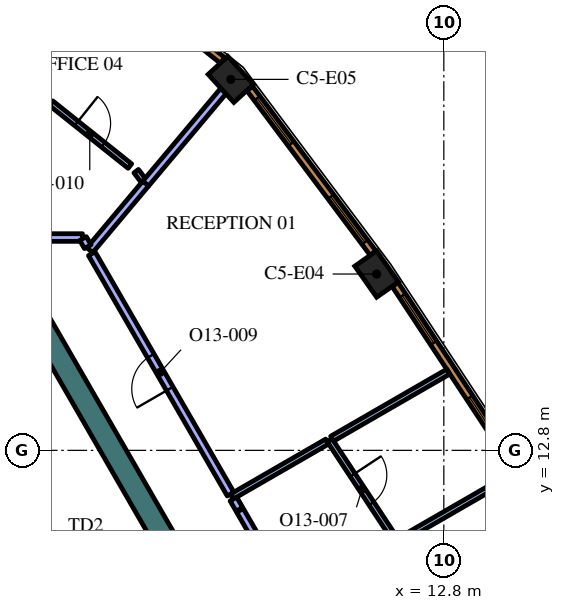
"""IFC4 building model, lengths in metres.
Left out: names, types, materials, properties, quantities, classifications, styles, units other than length and angle.
Written with IfcOpenShell. Run it as: python <this file> out.ifc"""

import sys

from ifc_helpers import new_model, si_unit, direction, frame, frame_2d, origin, origin_2d, place, context, subcontext, project, spatial, rectangle, extrude, element, fill, save


model = new_model("IFC4")
c1 = context("Model", 3, precision=1e-05, world=origin(), true_north=direction((0.0, 1.0)))
c2 = subcontext(c1, "Body", "Model", "MODEL_VIEW")
j1 = project(units=[si_unit("LENGTHUNIT", "METRE"), si_unit("PLANEANGLEUNIT", "RADIAN")], contexts=[c1])
p1 = place(None, origin())
s1 = spatial("IfcSite", under=j1, at=p1, CompositionType="ELEMENT")
p2 = place(p1, origin())
s2 = spatial("IfcBuilding", under=s1, at=p2, CompositionType="ELEMENT")
p3 = place(p2, frame((0.0, 0.0, 292.2)))
s3 = spatial("IfcBuildingStorey", under=s2, at=p3, CompositionType="ELEMENT", Elevation=292.2)
for number, where, z_axis, x_axis in (
    (1, (11.032, 17.44, 0.0), (0.0, 0.0, 1.0), (-0.575, 0.818, 0.0)),
    (2, (7.195, 22.561, 0.0), (0.0, 0.0, 1.0), (-0.676, 0.737, 0.0)),
):
    element("IfcColumn", number, at=place(p3, frame(where, z_axis=z_axis, x_axis=x_axis)), inside=s3, PredefinedType="COLUMN", context=c2, shape_type="SweptSolid", body=[
        extrude(rectangle(XDim=1.0, YDim=0.7, at=origin_2d()), origin(), (0.0, 0.0, 1.0), 4.2),
    ])
p4 = place(p3, frame((1.989, 16.456, 0.0), z_axis=(0.0, 0.0, 1.0), x_axis=(0.49999102663, -0.8660305845, 0.0)))
e3 = element("IfcWall", 3, at=p4, inside=s3, PredefinedType="SOLIDWALL", context=c2, shape_type="SweptSolid", body=[
    extrude(rectangle(XDim=12.406, YDim=0.6, at=frame_2d((6.203, 0.0))), origin(), (0.0, 0.0, 1.0), 4.2),
])
p5 = place(p3, frame((11.564, 10.387, 0.0), z_axis=(0.0, 0.0, 1.0), x_axis=(0.86604641216, 0.499963610661, 0.0)))
e4 = element("IfcWall", 4, at=p5, inside=s3, PredefinedType="PARTITIONING", context=c2, shape_type="SweptSolid", body=[
    extrude(rectangle(XDim=3.096, YDim=0.15, at=frame_2d((1.548, 0.0))), origin(), (0.0, 0.0, 1.0), 3.55),
])
p6 = place(p3, frame((9.795, 13.068, 0.0), z_axis=(0.0, 0.0, 1.0), x_axis=(0.550767347659, -0.834658809786, 0.0)))
e5 = element("IfcWall", 5, at=p6, inside=s3, PredefinedType="PARTITIONING", context=c2, shape_type="SweptSolid", body=[
    extrude(rectangle(XDim=2.999, YDim=0.15, at=frame_2d((1.5, 0.0))), origin(), (0.0, 0.0, 1.0), 3.55),
])
p7 = place(p6, frame((1.099, 0.0, 0.0)))
e6 = element("IfcOpeningElement", 6, at=p7, cuts=e5, PredefinedType="OPENING", context=c2, shape_type="SweptSolid", body=[
    extrude(rectangle(XDim=0.9, YDim=2.1, at=frame_2d((0.45, 1.05))), frame((0.0, 0.085, 0.0), z_axis=(0.0, -1.0, 0.0), x_axis=(1.0, 0.0, 0.0)), (0.0, 0.0, 1.0), 0.17),
])
p8 = place(p3, frame((9.86, 13.106, 0.0), z_axis=(0.0, 0.0, 1.0), x_axis=(0.866022094817, 0.500005731256, 0.0)))
e7 = element("IfcWall", 7, at=p8, inside=s3, PredefinedType="PARTITIONING", context=c2, shape_type="SweptSolid", body=[
    extrude(rectangle(XDim=3.531, YDim=0.15, at=frame_2d((1.766, 0.0))), origin(), (0.0, 0.0, 1.0), 3.55),
])
p9 = place(p3, frame((7.226, 11.585, 0.0), z_axis=(0.0, 0.0, 1.0), x_axis=(0.866021079084, 0.500007490527, 0.0)))
e8 = element("IfcWall", 8, at=p9, inside=s3, PredefinedType="PARTITIONING", context=c2, shape_type="SweptSolid", body=[
    extrude(rectangle(XDim=2.892, YDim=0.15, at=frame_2d((1.446, 0.0))), origin(), (0.0, 0.0, 1.0), 3.55),
])
p10 = place(p3, frame((13.436, 0.829, 0.0), z_axis=(0.0, 0.0, 1.0), x_axis=(-0.49999894854, 0.866026010844, 0.0)))
e9 = element("IfcWall", 9, at=p10, inside=s3, PredefinedType="PARTITIONING", context=c2, shape_type="SweptSolid", body=[
    extrude(rectangle(XDim=12.0, YDim=0.2, at=frame_2d((6.0, 0.0))), origin(), (0.0, 0.0, 1.0), 3.55),
])
p11 = place(p10, frame((5.5, 0.0, 0.0)))
e10 = element("IfcOpeningElement", 10, at=p11, cuts=e9, PredefinedType="OPENING", context=c2, shape_type="SweptSolid", body=[
    extrude(rectangle(XDim=1.0, YDim=2.1, at=frame_2d((0.5, 1.05))), frame((0.0, 0.11, 0.0), z_axis=(0.0, -1.0, 0.0), x_axis=(1.0, 0.0, 0.0)), (0.0, 0.0, 1.0), 0.22),
])
p12 = place(p3, frame((7.421, 11.247, 0.0), z_axis=(0.0, 0.0, 1.0), x_axis=(-0.500303403544, 0.865850162789, 0.0)))
e11 = element("IfcWall", 11, at=p12, inside=s3, PredefinedType="PARTITIONING", context=c2, shape_type="SweptSolid", body=[
    extrude(rectangle(XDim=0.315, YDim=0.2, at=frame_2d((0.158, 0.0))), origin(), (0.0, 0.0, 1.0), 3.55),
])
p13 = place(p3, frame((4.95, 19.814, 0.0), z_axis=(0.0, 0.0, 1.0), x_axis=(0.642981953866, 0.765881326971, 0.0)))
e12 = element("IfcWall", 12, at=p13, inside=s3, PredefinedType="PARTITIONING", context=c2, shape_type="SweptSolid", body=[
    extrude(rectangle(XDim=3.188, YDim=0.2, at=frame_2d((1.594, 0.0))), origin(), (0.0, 0.0, 1.0), 3.55),
])
p14 = place(p3, frame((3.483, 18.067, 0.0), z_axis=(0.0, 0.0, 1.0), x_axis=(0.642896944312, 0.765952687177, 0.0)))
e13 = element("IfcWall", 13, at=p14, inside=s3, PredefinedType="PARTITIONING", context=c2, shape_type="SweptSolid", body=[
    extrude(rectangle(XDim=2.29, YDim=0.2, at=frame_2d((1.145, 0.0))), origin(), (0.0, 0.0, 1.0), 3.55),
])
p15 = place(p3, frame((7.188, 11.65, 0.0), z_axis=(0.0, 0.0, 1.0), x_axis=(-0.499989634868, 0.866031388014, 0.0)))
e14 = element("IfcWall", 14, at=p15, inside=s3, PredefinedType="PARTITIONING", context=c2, shape_type="SweptSolid", body=[
    extrude(rectangle(XDim=7.303, YDim=0.2, at=frame_2d((3.652, 0.0))), origin(), (0.0, 0.0, 1.0), 3.55),
])
p16 = place(p15, frame((3.2, 0.0, 0.0)))
e15 = element("IfcOpeningElement", 15, at=p16, cuts=e14, PredefinedType="OPENING", context=c2, shape_type="SweptSolid", body=[
    extrude(rectangle(XDim=1.0, YDim=2.1, at=frame_2d((0.5, 1.05))), frame((0.0, 0.11, 0.0), z_axis=(0.0, -1.0, 0.0), x_axis=(1.0, 0.0, 0.0)), (0.0, 0.0, 1.0), 0.22),
])
p17 = place(p3, frame((4.891, 19.899, 0.0), z_axis=(0.0, 0.0, 1.0), x_axis=(-0.6, 0.8, 0.0)))
e16 = element("IfcWall", 16, at=p17, inside=s3, PredefinedType="PARTITIONING", context=c2, shape_type="SweptSolid", body=[
    extrude(rectangle(XDim=0.309, YDim=0.15, at=frame_2d((0.154, 0.0))), origin(), (0.0, 0.0, 1.0), 3.55),
])
p18 = place(p3, frame((2.462, 21.937, 0.0), z_axis=(0.0, 0.0, 1.0), x_axis=(0.781630346222, -0.62374193531, 0.0)))
e17 = element("IfcWall", 17, at=p18, inside=s3, PredefinedType="PARTITIONING", context=c2, shape_type="SweptSolid", body=[
    extrude(rectangle(XDim=2.656, YDim=0.15, at=frame_2d((1.328, 0.0))), origin(), (0.0, 0.0, 1.0), 3.55),
])
p19 = place(p18, frame((0.857, 0.0, 0.0)))
e18 = element("IfcOpeningElement", 18, at=p19, cuts=e17, PredefinedType="OPENING", context=c2, shape_type="SweptSolid", body=[
    extrude(rectangle(XDim=0.9, YDim=2.1, at=frame_2d((0.45, 1.05))), frame((0.0, 0.085, 0.0), z_axis=(0.0, -1.0, 0.0), x_axis=(1.0, 0.0, 0.0)), (0.0, 0.0, 1.0), 0.17),
])
p20 = place(p3, frame((3.291, 18.4, 0.0), z_axis=(0.0, 0.0, 1.0), x_axis=(-1.0, 0.0, 0.0)))
e19 = element("IfcWall", 19, at=p20, inside=s3, PredefinedType="PARTITIONING", context=c2, shape_type="SweptSolid", body=[
    extrude(rectangle(XDim=6.582, YDim=0.2, at=frame_2d((3.291, 0.0))), origin(), (0.0, 0.0, 1.0), 3.55),
])
p21 = place(p3, frame((3.43, 18.159, 0.0), z_axis=(0.0, 0.0, 1.0), x_axis=(-0.499949632511, 0.866054481515, 0.0)))
e20 = element("IfcWall", 20, at=p21, inside=s3, PredefinedType="PARTITIONING", context=c2, shape_type="SweptSolid", body=[
    extrude(rectangle(XDim=0.248, YDim=0.2, at=frame_2d((0.124, 0.0))), origin(), (0.0, 0.0, 1.0), 3.55),
])
p22 = place(p3, frame((14.496, 12.653, 0.0), z_axis=(0.0, 0.0, 1.0), x_axis=(-0.550744054781, 0.83467417962, 0.0)))
e21 = element("IfcWall", 21, at=p22, inside=s3, PredefinedType="SOLIDWALL", context=c2, shape_type="SweptSolid", body=[
    extrude(rectangle(XDim=5.406, YDim=0.19, at=frame_2d((2.703, 0.0))), origin(), (0.0, 0.0, 1.0), 3.95),
])
p23 = place(p22, frame((0.346, 0.0, 0.6)))
e22 = element("IfcOpeningElement", 22, at=p23, cuts=e21, PredefinedType="OPENING", context=c2, shape_type="SweptSolid", body=[
    extrude(rectangle(XDim=1.5, YDim=2.85, at=frame_2d((0.75, 1.425))), frame((0.0, 0.105, 0.0), z_axis=(0.0, -1.0, 0.0), x_axis=(1.0, 0.0, 0.0)), (0.0, 0.0, 1.0), 0.21),
])
p24 = place(p22, frame((3.559, 0.0, 0.6)))
e23 = element("IfcOpeningElement", 23, at=p24, cuts=e21, PredefinedType="OPENING", context=c2, shape_type="SweptSolid", body=[
    extrude(rectangle(XDim=1.5, YDim=2.85, at=frame_2d((0.75, 1.425))), frame((0.0, 0.105, 0.0), z_axis=(0.0, -1.0, 0.0), x_axis=(1.0, 0.0, 0.0)), (0.0, 0.0, 1.0), 0.21),
])
p25 = place(p3, frame((10.938, 17.99, 0.0), z_axis=(0.0, 0.0, 1.0), x_axis=(-0.599559865294, 0.800329911929, 0.0)))
e24 = element("IfcWall", 24, at=p25, inside=s3, PredefinedType="SOLIDWALL", context=c2, shape_type="SweptSolid", body=[
    extrude(rectangle(XDim=5.415, YDim=0.19, at=frame_2d((2.708, 0.0))), origin(), (0.0, 0.0, 1.0), 3.95),
])
p26 = place(p25, frame((0.358, 0.0, 0.6)))
e25 = element("IfcOpeningElement", 25, at=p26, cuts=e24, PredefinedType="OPENING", context=c2, shape_type="SweptSolid", body=[
    extrude(rectangle(XDim=1.5, YDim=2.85, at=frame_2d((0.75, 1.425))), frame((0.0, 0.105, 0.0), z_axis=(0.0, -1.0, 0.0), x_axis=(1.0, 0.0, 0.0)), (0.0, 0.0, 1.0), 0.21),
])
p27 = place(p25, frame((3.593, 0.0, 0.6)))
e26 = element("IfcOpeningElement", 26, at=p27, cuts=e24, PredefinedType="OPENING", context=c2, shape_type="SweptSolid", body=[
    extrude(rectangle(XDim=1.5, YDim=2.85, at=frame_2d((0.75, 1.425))), frame((0.0, 0.105, 0.0), z_axis=(0.0, -1.0, 0.0), x_axis=(1.0, 0.0, 0.0)), (0.0, 0.0, 1.0), 0.21),
])
p28 = place(p3, frame((6.977, 23.061, 0.0), z_axis=(0.0, 0.0, 1.0), x_axis=(-0.781626234064, 0.623747088349, 0.0)))
e27 = element("IfcWall", 27, at=p28, inside=s3, PredefinedType="SOLIDWALL", context=c2, shape_type="SweptSolid", body=[
    extrude(rectangle(XDim=3.237, YDim=0.19, at=frame_2d((1.618, 0.0))), origin(), (0.0, 0.0, 1.0), 3.95),
])
p29 = place(p28, frame((1.068, 0.0, 0.6)))
e28 = element("IfcOpeningElement", 28, at=p29, cuts=e27, PredefinedType="OPENING", context=c2, shape_type="SweptSolid", body=[
    extrude(rectangle(XDim=1.1, YDim=2.85, at=frame_2d((0.55, 1.425))), frame((0.0, 0.105, 0.0), z_axis=(0.0, -1.0, 0.0), x_axis=(1.0, 0.0, 0.0)), (0.0, 0.0, 1.0), 0.21),
])
p30 = place(p7, origin())
e29 = element("IfcDoor", 29, at=p30, inside=s3, OperationType="SINGLE_SWING_RIGHT", PredefinedType="DOOR", context=c2, shape_type="SweptSolid", body=[
    extrude(rectangle(XDim=0.9, YDim=2.1, at=frame_2d((0.45, 1.05))), frame((0.0, 0.025, 0.0), z_axis=(0.0, -1.0, 0.0), x_axis=(1.0, 0.0, 0.0)), (0.0, 0.0, 1.0), 0.05),
])
fill(e6, e29)
p31 = place(p16, origin())
e30 = element("IfcDoor", 30, at=p31, inside=s3, OperationType="SINGLE_SWING_RIGHT", PredefinedType="DOOR", context=c2, shape_type="SweptSolid", body=[
    extrude(rectangle(XDim=1.0, YDim=2.1, at=frame_2d((0.5, 1.05))), frame((0.0, 0.025, 0.0), z_axis=(0.0, -1.0, 0.0), x_axis=(1.0, 0.0, 0.0)), (0.0, 0.0, 1.0), 0.05),
])
fill(e15, e30)
p32 = place(p19, origin())
e31 = element("IfcDoor", 31, at=p32, inside=s3, OperationType="SINGLE_SWING_LEFT", PredefinedType="DOOR", context=c2, shape_type="SweptSolid", body=[
    extrude(rectangle(XDim=0.9, YDim=2.1, at=frame_2d((0.45, 1.05))), frame((0.0, 0.025, 0.0), z_axis=(0.0, -1.0, 0.0), x_axis=(1.0, 0.0, 0.0)), (0.0, 0.0, 1.0), 0.05),
])
fill(e18, e31)
p33 = place(p23, origin())
e32 = element("IfcWindow", 32, at=p33, inside=s3, PartitioningType="SINGLE_PANEL", PredefinedType="WINDOW", context=c2, shape_type="SweptSolid", body=[
    extrude(rectangle(XDim=1.5, YDim=2.85, at=frame_2d((0.75, 1.425))), frame((0.0, 0.045, 0.0), z_axis=(0.0, -1.0, 0.0), x_axis=(1.0, 0.0, 0.0)), (0.0, 0.0, 1.0), 0.06),
])
fill(e22, e32)
p34 = place(p24, origin())
e33 = element("IfcWindow", 33, at=p34, inside=s3, PartitioningType="SINGLE_PANEL", PredefinedType="WINDOW", context=c2, shape_type="SweptSolid", body=[
    extrude(rectangle(XDim=1.5, YDim=2.85, at=frame_2d((0.75, 1.425))), frame((0.0, 0.045, 0.0), z_axis=(0.0, -1.0, 0.0), x_axis=(1.0, 0.0, 0.0)), (0.0, 0.0, 1.0), 0.06),
])
fill(e23, e33)
p35 = place(p26, origin())
e34 = element("IfcWindow", 34, at=p35, inside=s3, PartitioningType="SINGLE_PANEL", PredefinedType="WINDOW", context=c2, shape_type="SweptSolid", body=[
    extrude(rectangle(XDim=1.5, YDim=2.85, at=frame_2d((0.75, 1.425))), frame((0.0, 0.045, 0.0), z_axis=(0.0, -1.0, 0.0), x_axis=(1.0, 0.0, 0.0)), (0.0, 0.0, 1.0), 0.06),
])
fill(e25, e34)
p36 = place(p27, origin())
e35 = element("IfcWindow", 35, at=p36, inside=s3, PartitioningType="SINGLE_PANEL", PredefinedType="WINDOW", context=c2, shape_type="SweptSolid", body=[
    extrude(rectangle(XDim=1.5, YDim=2.85, at=frame_2d((0.75, 1.425))), frame((0.0, 0.045, 0.0), z_axis=(0.0, -1.0, 0.0), x_axis=(1.0, 0.0, 0.0)), (0.0, 0.0, 1.0), 0.06),
])
fill(e26, e35)
save(model, sys.argv[1])
